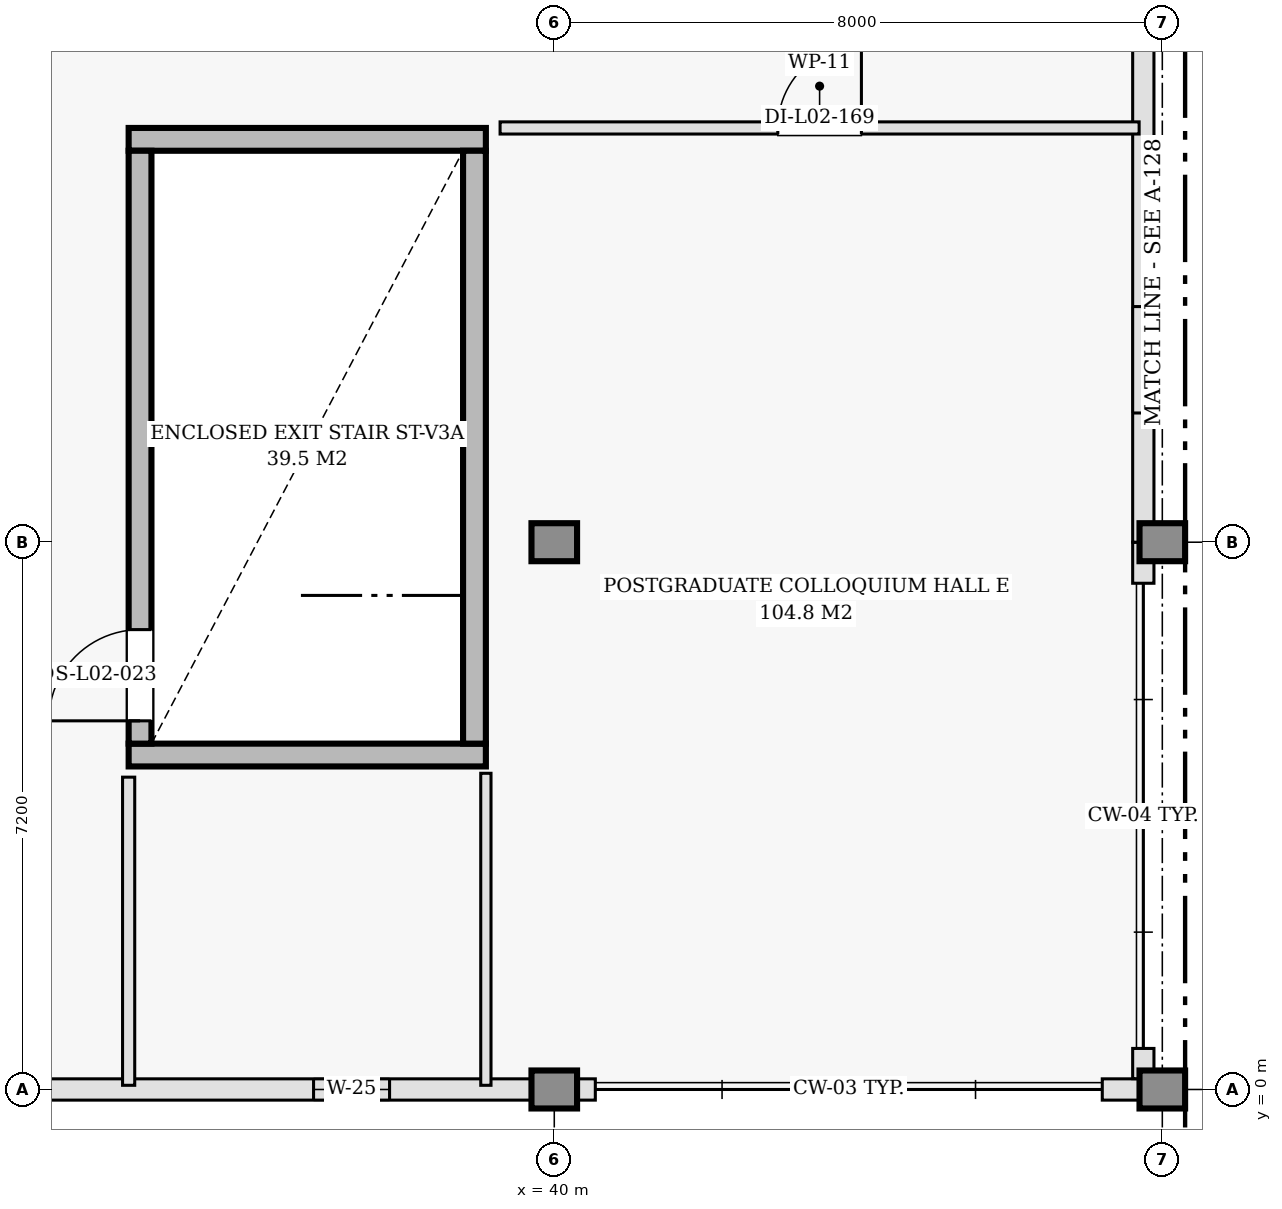
"""IFC4 building model, lengths in metres.
Left out: names, types, materials, properties, quantities, classifications, styles, units other than length and angle.
Written with IfcOpenShell. Run it as: python <this file> out.ifc"""

import sys

from ifc_helpers import new_model, si_unit, direction, frame, frame_2d, origin, origin_2d, place, context, subcontext, project, spatial, rectangle, extrude, element, fill, save


model = new_model("IFC4")
c1 = context("Model", 3, precision=1e-05, world=origin(), true_north=direction((0.0, 1.0)))
c2 = subcontext(c1, "Body", "Model", "MODEL_VIEW")
j1 = project(units=[si_unit("LENGTHUNIT", "METRE"), si_unit("PLANEANGLEUNIT", "RADIAN")], contexts=[c1])
p1 = place(None, origin())
s1 = spatial("IfcSite", under=j1, at=p1, CompositionType="ELEMENT")
p2 = place(p1, origin())
s2 = spatial("IfcBuilding", under=s1, at=p2, CompositionType="ELEMENT")
p3 = place(p2, frame((0.0, 0.0, 9.6)))
s3 = spatial("IfcBuildingStorey", under=s2, at=p3, CompositionType="ELEMENT", Elevation=9.6)
for number, where, z_axis, x_axis in (
    (1, (40.0, 0.0, 0.0), (0.0, 0.0, 1.0), (1.0, 0.0, 0.0)),
    (2, (40.0, 7.2, 0.0), (0.0, 0.0, 1.0), (1.0, 0.0, 0.0)),
    (3, (48.0, 0.0, 0.0), (0.0, 0.0, 1.0), (1.0, 0.0, 0.0)),
    (4, (48.0, 7.2, 0.0), (0.0, 0.0, 1.0), (1.0, 0.0, 0.0)),
):
    element("IfcColumn", number, at=place(p3, frame(where, z_axis=z_axis, x_axis=x_axis)), inside=s3, PredefinedType="COLUMN", context=c2, shape_type="SweptSolid", body=[
        extrude(rectangle(XDim=0.5, YDim=0.5, at=origin_2d()), origin(), (0.0, 0.0, 1.0), 4.2),
    ])
p4 = place(p3, frame((32.0, 0.0, 0.0), z_axis=(0.0, 0.0, 1.0), x_axis=(1.0, 0.0, 0.0)))
e5 = element("IfcWall", 5, at=p4, inside=s3, PredefinedType="SOLIDWALL", context=c2, shape_type="SweptSolid", body=[
    extrude(rectangle(XDim=8.0, YDim=0.28, at=frame_2d((4.0, 0.0))), origin(), (0.0, 0.0, 1.0), 4.2),
])
p5 = place(p4, frame((4.833, 0.0, 0.9)))
e6 = element("IfcOpeningElement", 6, at=p5, cuts=e5, PredefinedType="OPENING", context=c2, shape_type="SweptSolid", body=[
    extrude(rectangle(XDim=1.0, YDim=2.15, at=frame_2d((0.5, 1.075))), frame((0.0, 0.15, 0.0), z_axis=(0.0, -1.0, 0.0), x_axis=(1.0, 0.0, 0.0)), (0.0, 0.0, 1.0), 0.3),
])
for number, where, z_axis, x_axis in (
    (7, (40.0, 0.0, 0.0), (0.0, 0.0, 1.0), (1.0, 0.0, 0.0)),
    (8, (47.21, 0.0, 0.0), (0.0, 0.0, 1.0), (1.0, 0.0, 0.0)),
):
    element("IfcWall", number, at=place(p3, frame(where, z_axis=z_axis, x_axis=x_axis)), inside=s3, PredefinedType="SOLIDWALL", context=c2, shape_type="SweptSolid", body=[
        extrude(rectangle(XDim=0.54, YDim=0.28, at=frame_2d((0.27, 0.0))), origin(), (0.0, 0.0, 1.0), 4.2),
    ])
p6 = place(p3, frame((47.75, 0.142, 0.0), z_axis=(0.0, 0.0, 1.0), x_axis=(0.0, 1.0, 0.0)))
e9 = element("IfcWall", 9, at=p6, inside=s3, PredefinedType="SOLIDWALL", context=c2, shape_type="SweptSolid", body=[
    extrude(rectangle(XDim=0.398, YDim=0.28, at=frame_2d((0.199, 0.0))), origin(), (0.0, 0.0, 1.0), 3.385),
])
p7 = place(p3, frame((47.75, 6.66, 0.0), z_axis=(0.0, 0.0, 1.0), x_axis=(0.0, 1.0, 0.0)))
e10 = element("IfcWall", 10, at=p7, inside=s3, PredefinedType="SOLIDWALL", context=c2, shape_type="SweptSolid", body=[
    extrude(rectangle(XDim=0.54, YDim=0.28, at=frame_2d((0.27, 0.0))), origin(), (0.0, 0.0, 1.0), 3.385),
])
p8 = place(p3, frame((47.75, 7.2, 0.0), z_axis=(0.0, 0.0, 1.0), x_axis=(0.0, 1.0, 0.0)))
e11 = element("IfcWall", 11, at=p8, inside=s3, PredefinedType="SOLIDWALL", context=c2, shape_type="SweptSolid", body=[
    extrude(rectangle(XDim=7.2, YDim=0.28, at=frame_2d((3.6, 0.0))), origin(), (0.0, 0.0, 1.0), 3.385),
])
p9 = place(p8, frame((1.7, 0.0, 0.9)))
e12 = element("IfcOpeningElement", 12, at=p9, cuts=e11, PredefinedType="OPENING", context=c2, shape_type="SweptSolid", body=[
    extrude(rectangle(XDim=1.4, YDim=2.2, at=frame_2d((0.7, 1.1))), frame((0.0, 0.15, 0.0), z_axis=(0.0, -1.0, 0.0), x_axis=(1.0, 0.0, 0.0)), (0.0, 0.0, 1.0), 0.3),
])
for number, where, z_axis, x_axis in (
    (13, (34.4, 4.4, 0.0), (0.0, 0.0, 1.0), (1.0, 0.0, 0.0)),
    (14, (34.4, 12.5, 0.0), (0.0, 0.0, 1.0), (1.0, 0.0, 0.0)),
):
    element("IfcWall", number, at=place(p3, frame(where, z_axis=z_axis, x_axis=x_axis)), inside=s3, PredefinedType="SHEAR", context=c2, shape_type="SweptSolid", body=[
        extrude(rectangle(XDim=4.7, YDim=0.3, at=frame_2d((2.35, 0.0))), origin(), (0.0, 0.0, 1.0), 4.0),
    ])
p10 = place(p3, frame((34.55, 4.55, 0.0), z_axis=(0.0, 0.0, 1.0), x_axis=(0.0, 1.0, 0.0)))
e15 = element("IfcWall", 15, at=p10, inside=s3, PredefinedType="SHEAR", context=c2, shape_type="SweptSolid", body=[
    extrude(rectangle(XDim=7.8, YDim=0.3, at=frame_2d((3.9, 0.0))), origin(), (0.0, 0.0, 1.0), 4.0),
])
p11 = place(p10, frame((0.3, 0.0, 0.0)))
e16 = element("IfcOpeningElement", 16, at=p11, cuts=e15, PredefinedType="OPENING", context=c2, shape_type="SweptSolid", body=[
    extrude(rectangle(XDim=1.2, YDim=2.15, at=frame_2d((0.6, 1.075))), frame((0.0, 0.16, 0.0), z_axis=(0.0, -1.0, 0.0), x_axis=(1.0, 0.0, 0.0)), (0.0, 0.0, 1.0), 0.32),
])
p12 = place(p3, frame((38.95, 4.55, 0.0), z_axis=(0.0, 0.0, 1.0), x_axis=(0.0, 1.0, 0.0)))
e17 = element("IfcWall", 17, at=p12, inside=s3, PredefinedType="SHEAR", context=c2, shape_type="SweptSolid", body=[
    extrude(rectangle(XDim=7.8, YDim=0.3, at=frame_2d((3.9, 0.0))), origin(), (0.0, 0.0, 1.0), 4.0),
])
p13 = place(p3, frame((39.287, 12.65, 0.0), z_axis=(0.0, 0.0, 1.0), x_axis=(1.0, 0.0, 0.0)))
e18 = element("IfcWall", 18, at=p13, inside=s3, PredefinedType="PARTITIONING", context=c2, shape_type="SweptSolid", body=[
    extrude(rectangle(XDim=8.408, YDim=0.16, at=frame_2d((4.204, 0.0))), origin(), (0.0, 0.0, 1.0), 3.94),
])
p14 = place(p13, frame((3.654, 0.0, 0.0)))
e19 = element("IfcOpeningElement", 19, at=p14, cuts=e18, PredefinedType="OPENING", context=c2, shape_type="SweptSolid", body=[
    extrude(rectangle(XDim=1.1, YDim=2.15, at=frame_2d((0.55, 1.075))), frame((0.0, 0.09, 0.0), z_axis=(0.0, -1.0, 0.0), x_axis=(1.0, 0.0, 0.0)), (0.0, 0.0, 1.0), 0.18),
])
p15 = place(p3, frame((39.1, 0.055, 0.0), z_axis=(0.0, 0.0, 1.0), x_axis=(0.0, 1.0, 0.0)))
e20 = element("IfcWall", 20, at=p15, inside=s3, PredefinedType="PARTITIONING", context=c2, shape_type="SweptSolid", body=[
    extrude(rectangle(XDim=4.105, YDim=0.135, at=frame_2d((2.052, 0.0))), origin(), (0.0, 0.0, 1.0), 3.94),
])
p16 = place(p3, frame((34.4, 0.055, 0.0), z_axis=(0.0, 0.0, 1.0), x_axis=(0.0, 1.0, 0.0)))
e21 = element("IfcWall", 21, at=p16, inside=s3, PredefinedType="PARTITIONING", context=c2, shape_type="SweptSolid", body=[
    extrude(rectangle(XDim=4.054, YDim=0.16, at=frame_2d((2.027, 0.0))), origin(), (0.0, 0.0, 1.0), 3.94),
])
p17 = place(p5, origin())
e22 = element("IfcWindow", 22, at=p17, inside=s3, PartitioningType="DOUBLE_PANEL_VERTICAL", PredefinedType="WINDOW", context=c2, shape_type="SweptSolid", body=[
    extrude(rectangle(XDim=1.0, YDim=2.15, at=frame_2d((0.5, 1.075))), frame((0.0, 0.03, 0.0), z_axis=(0.0, -1.0, 0.0), x_axis=(1.0, 0.0, 0.0)), (0.0, 0.0, 1.0), 0.06),
])
fill(e6, e22)
p18 = place(p9, origin())
e23 = element("IfcWindow", 23, at=p18, inside=s3, PartitioningType="DOUBLE_PANEL_VERTICAL", PredefinedType="WINDOW", context=c2, shape_type="SweptSolid", body=[
    extrude(rectangle(XDim=1.4, YDim=2.2, at=frame_2d((0.7, 1.1))), frame((0.0, 0.03, 0.0), z_axis=(0.0, -1.0, 0.0), x_axis=(1.0, 0.0, 0.0)), (0.0, 0.0, 1.0), 0.06),
])
fill(e12, e23)
p19 = place(p11, origin())
e24 = element("IfcDoor", 24, at=p19, inside=s3, OperationType="SINGLE_SWING_LEFT", PredefinedType="DOOR", context=c2, shape_type="SweptSolid", body=[
    extrude(rectangle(XDim=1.2, YDim=2.15, at=frame_2d((0.6, 1.075))), frame((0.0, 0.025, 0.0), z_axis=(0.0, -1.0, 0.0), x_axis=(1.0, 0.0, 0.0)), (0.0, 0.0, 1.0), 0.05),
])
fill(e16, e24)
p20 = place(p14, origin())
e25 = element("IfcDoor", 25, at=p20, inside=s3, OperationType="SINGLE_SWING_RIGHT", PredefinedType="DOOR", context=c2, shape_type="SweptSolid", body=[
    extrude(rectangle(XDim=1.1, YDim=2.15, at=frame_2d((0.55, 1.075))), frame((0.0, 0.025, 0.0), z_axis=(0.0, -1.0, 0.0), x_axis=(1.0, 0.0, 0.0)), (0.0, 0.0, 1.0), 0.05),
])
fill(e19, e25)
save(model, sys.argv[1])
